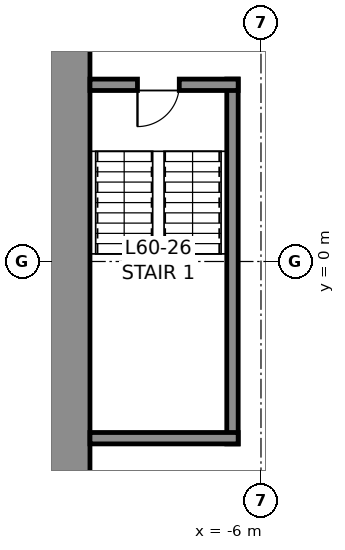
"""IFC4 building model, lengths in metres.
Left out: names, types, materials, properties, quantities, classifications, styles, units other than length and angle.
Written with IfcOpenShell. Run it as: python <this file> out.ifc"""

import sys

from ifc_helpers import new_model, si_unit, direction, frame, frame_2d, origin, place, context, subcontext, project, spatial, rectangle, extrude, element, fill, save


model = new_model("IFC4")
c1 = context("Model", 3, precision=1e-05, world=origin(), true_north=direction((0.0, 1.0)))
c2 = subcontext(c1, "Body", "Model", "MODEL_VIEW")
j1 = project(units=[si_unit("LENGTHUNIT", "METRE"), si_unit("PLANEANGLEUNIT", "RADIAN")], contexts=[c1])
p1 = place(None, origin())
s1 = spatial("IfcSite", under=j1, at=p1, CompositionType="ELEMENT")
p2 = place(p1, origin())
s2 = spatial("IfcBuilding", under=s1, at=p2, CompositionType="ELEMENT")
p3 = place(p2, frame((0.0, 0.0, 269.8)))
s3 = spatial("IfcBuildingStorey", under=s2, at=p3, CompositionType="ELEMENT", Elevation=269.8)
p4 = place(p3, frame((-11.25, -10.5, 0.0), z_axis=(0.0, 0.0, 1.0), x_axis=(0.0, 1.0, 0.0)))
e1 = element("IfcWall", 1, at=p4, inside=s3, PredefinedType="SHEAR", context=c2, shape_type="SweptSolid", body=[
    extrude(rectangle(XDim=21.0, YDim=1.5, at=frame_2d((10.5, 0.0))), origin(), (0.0, 0.0, 1.0), 4.0),
])
p5 = place(p4, frame((16.1, 0.0, 0.0)))
e2 = element("IfcOpeningElement", 2, at=p5, cuts=e1, PredefinedType="OPENING", context=c2, shape_type="SweptSolid", body=[
    extrude(rectangle(XDim=1.2, YDim=2.3, at=frame_2d((0.6, 1.15))), frame((0.0, 0.76, 0.0), z_axis=(0.0, -1.0, 0.0), x_axis=(1.0, 0.0, 0.0)), (0.0, 0.0, 1.0), 1.52),
])
p6 = place(p4, frame((3.7, 0.0, 0.0)))
e3 = element("IfcOpeningElement", 3, at=p6, cuts=e1, PredefinedType="OPENING", context=c2, shape_type="SweptSolid", body=[
    extrude(rectangle(XDim=1.2, YDim=2.3, at=frame_2d((0.6, 1.15))), frame((0.0, 0.76, 0.0), z_axis=(0.0, -1.0, 0.0), x_axis=(1.0, 0.0, 0.0)), (0.0, 0.0, 1.0), 1.52),
])
p7 = place(p3, frame((-6.75, -4.8, 0.0), z_axis=(0.0, 0.0, 1.0), x_axis=(0.0, 1.0, 0.0)))
e4 = element("IfcWall", 4, at=p7, inside=s3, PredefinedType="SOLIDWALL", context=c2, shape_type="SweptSolid", body=[
    extrude(rectangle(XDim=9.6, YDim=0.3, at=frame_2d((4.8, 0.0))), origin(), (0.0, 0.0, 1.0), 3.75),
])
p8 = place(p3, frame((-10.5, 4.65, 0.0), z_axis=(0.0, 0.0, 1.0), x_axis=(1.0, 0.0, 0.0)))
e5 = element("IfcWall", 5, at=p8, inside=s3, PredefinedType="SOLIDWALL", context=c2, shape_type="SweptSolid", body=[
    extrude(rectangle(XDim=3.9, YDim=0.3, at=frame_2d((1.95, 0.0))), origin(), (0.0, 0.0, 1.0), 3.75),
])
p9 = place(p8, frame((1.25, 0.0, 0.0)))
e6 = element("IfcOpeningElement", 6, at=p9, cuts=e5, PredefinedType="OPENING", context=c2, shape_type="SweptSolid", body=[
    extrude(rectangle(XDim=1.1, YDim=2.3, at=frame_2d((0.55, 1.15))), frame((0.0, 0.16, 0.0), z_axis=(0.0, -1.0, 0.0), x_axis=(1.0, 0.0, 0.0)), (0.0, 0.0, 1.0), 0.32),
])
p10 = place(p3, frame((-6.6, -4.65, 0.0), z_axis=(0.0, 0.0, 1.0), x_axis=(-1.0, 0.0, 0.0)))
e7 = element("IfcWall", 7, at=p10, inside=s3, PredefinedType="SOLIDWALL", context=c2, shape_type="SweptSolid", body=[
    extrude(rectangle(XDim=3.9, YDim=0.3, at=frame_2d((1.95, 0.0))), origin(), (0.0, 0.0, 1.0), 3.75),
])
p11 = place(p9, frame((1.1, 0.0, 0.0), z_axis=(0.0, 0.0, 1.0), x_axis=(-1.0, 0.0, 0.0)))
e8 = element("IfcDoor", 8, at=p11, inside=s3, OperationType="SINGLE_SWING_RIGHT", PredefinedType="DOOR", context=c2, shape_type="SweptSolid", body=[
    extrude(rectangle(XDim=1.1, YDim=2.3, at=frame_2d((0.55, 1.15))), frame((0.0, 0.025, 0.0), z_axis=(0.0, -1.0, 0.0), x_axis=(1.0, 0.0, 0.0)), (0.0, 0.0, 1.0), 0.05),
])
fill(e6, e8)
save(model, sys.argv[1])
